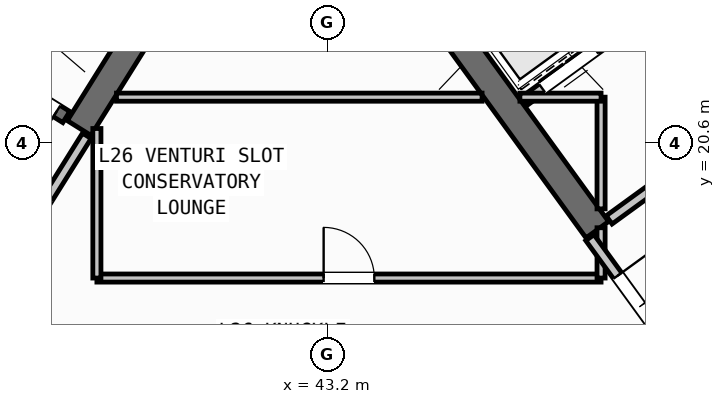
"""IFC4 building model, lengths in metres.
Left out: names, types, materials, properties, quantities, classifications, styles, units other than length and angle.
Written with IfcOpenShell. Run it as: python <this file> out.ifc"""

import sys

from ifc_helpers import new_model, si_unit, direction, frame, frame_2d, origin, place, context, subcontext, project, spatial, rectangle, extrude, source, transform, mapped, element, fill, save


model = new_model("IFC4")
c1 = context("Model", 3, precision=1e-05, world=origin(), true_north=direction((0.0, 1.0)))
c2 = subcontext(c1, "Body", "Model", "MODEL_VIEW")
j1 = project(units=[si_unit("LENGTHUNIT", "METRE"), si_unit("PLANEANGLEUNIT", "RADIAN")], contexts=[c1])
p1 = place(None, origin())
s1 = spatial("IfcSite", under=j1, at=p1, CompositionType="ELEMENT")
p2 = place(p1, origin())
s2 = spatial("IfcBuilding", under=s1, at=p2, CompositionType="ELEMENT")
p3 = place(p2, frame((0.0, 0.0, 105.3)))
s3 = spatial("IfcBuildingStorey", under=s2, at=p3, CompositionType="ELEMENT", Elevation=105.3)
p4 = place(p3, frame((40.194, 23.922, 0.0), z_axis=(0.0, 0.0, 1.0), x_axis=(-0.529888438328, -0.848067357541, 0.0)))
e1 = element("IfcWall", 1, at=p4, inside=s3, PredefinedType="SHEAR", context=c2, shape_type="SweptSolid", body=[
    extrude(rectangle(XDim=3.575, YDim=0.55, at=frame_2d((1.788, 0.0))), origin(), (0.0, 0.0, 1.0), 3.35),
])
p5 = place(p3, frame((48.526, 18.884, 0.0), z_axis=(0.0, 0.0, 1.0), x_axis=(-0.587764933797, 0.809031756236, 0.0)))
e2 = element("IfcWall", 2, at=p5, inside=s3, PredefinedType="SHEAR", context=c2, shape_type="SweptSolid", body=[
    extrude(rectangle(XDim=6.425, YDim=0.55, at=frame_2d((3.212, 0.0))), origin(), (0.0, 0.0, 1.0), 3.35),
])
p6 = place(p3, frame((38.046, 21.108, 0.0), z_axis=(0.0, 0.0, 1.0), x_axis=(-0.848054434086, 0.529909121291, 0.0)))
e3 = element("IfcWall", 3, at=p6, inside=s3, PredefinedType="SHEAR", context=c2, shape_type="SweptSolid", body=[
    extrude(rectangle(XDim=7.33, YDim=0.26, at=frame_2d((3.665, 0.0))), origin(), (0.0, 0.0, 1.0), 3.35),
])
p7 = place(p6, frame((0.22, 0.0, 0.0)))
e4 = element("IfcOpeningElement", 4, at=p7, cuts=e3, PredefinedType="OPENING", context=c2, shape_type="SweptSolid", body=[
    extrude(rectangle(XDim=1.1, YDim=2.1, at=frame_2d((0.55, 1.05))), frame((0.0, 0.14, 0.0), z_axis=(0.0, -1.0, 0.0), x_axis=(1.0, 0.0, 0.0)), (0.0, 0.0, 1.0), 0.28),
])
p8 = place(p3, frame((47.065, 21.407, 0.0), z_axis=(0.0, 0.0, 1.0), x_axis=(0.809032984992, 0.587763242466, 0.0)))
e5 = element("IfcWall", 5, at=p8, inside=s3, PredefinedType="STANDARD", context=c2, shape_type="SweptSolid", body=[
    extrude(rectangle(XDim=3.448, YDim=0.2, at=frame_2d((1.724, 0.0))), origin(), (0.0, 0.0, 1.0), 3.34),
])
p9 = place(p8, frame((0.458, 0.0, 0.0)))
e6 = element("IfcOpeningElement", 6, at=p9, cuts=e5, PredefinedType="OPENING", context=c2, shape_type="SweptSolid", body=[
    extrude(rectangle(XDim=1.3, YDim=2.2, at=frame_2d((0.65, 1.1))), frame((0.0, 0.11, 0.0), z_axis=(0.0, -1.0, 0.0), x_axis=(1.0, 0.0, 0.0)), (0.0, 0.0, 1.0), 0.22),
])
p10 = place(p3, frame((48.758, 19.077, 0.0), z_axis=(0.0, 0.0, 1.0), x_axis=(0.809005065155, 0.587801671104, 0.0)))
e7 = element("IfcWall", 7, at=p10, inside=s3, PredefinedType="STANDARD", context=c2, shape_type="SweptSolid", body=[
    extrude(rectangle(XDim=5.768, YDim=0.2, at=frame_2d((2.884, 0.0))), origin(), (0.0, 0.0, 1.0), 3.34),
])
p11 = place(p10, frame((2.548, 0.0, 0.0)))
e8 = element("IfcOpeningElement", 8, at=p11, cuts=e7, PredefinedType="OPENING", context=c2, shape_type="SweptSolid", body=[
    extrude(rectangle(XDim=1.15, YDim=2.1, at=frame_2d((0.575, 1.05))), frame((0.0, 0.11, 0.0), z_axis=(0.0, -1.0, 0.0), x_axis=(1.0, 0.0, 0.0)), (0.0, 0.0, 1.0), 0.22),
])
p12 = place(p3, frame((38.451, 20.737, 0.0), z_axis=(0.0, 0.0, 1.0), x_axis=(-0.529924799939, -0.848044637038, 0.0)))
e9 = element("IfcWall", 9, at=p12, inside=s3, PredefinedType="STANDARD", context=c2, shape_type="SweptSolid", body=[
    extrude(rectangle(XDim=2.96, YDim=0.2, at=frame_2d((1.48, 0.0))), origin(), (0.0, 0.0, 1.0), 3.34),
])
p13 = place(p12, frame((1.46, 0.0, 0.0)))
e10 = element("IfcOpeningElement", 10, at=p13, cuts=e9, PredefinedType="OPENING", context=c2, shape_type="SweptSolid", body=[
    extrude(rectangle(XDim=0.86, YDim=2.05, at=frame_2d((0.43, 1.025))), frame((0.0, 0.11, 0.0), z_axis=(0.0, -1.0, 0.0), x_axis=(1.0, 0.0, 0.0)), (0.0, 0.0, 1.0), 0.22),
])
p14 = place(p3, frame((38.65, 17.93, 0.0), z_axis=(0.0, 0.0, 1.0), x_axis=(1.0, 0.0, 0.0)))
e11 = element("IfcWall", 11, at=p14, inside=s3, PredefinedType="PARTITIONING", context=c2, shape_type="SweptSolid", body=[
    extrude(rectangle(XDim=9.95, YDim=0.16, at=frame_2d((4.975, 0.0))), origin(), (0.0, 0.0, 1.0), 3.34),
])
p15 = place(p14, frame((4.475, 0.0, 0.0)))
e12 = element("IfcOpeningElement", 12, at=p15, cuts=e11, PredefinedType="OPENING", context=c2, shape_type="SweptSolid", body=[
    extrude(rectangle(XDim=1.0, YDim=2.1, at=frame_2d((0.5, 1.05))), frame((0.0, 0.09, 0.0), z_axis=(0.0, -1.0, 0.0), x_axis=(1.0, 0.0, 0.0)), (0.0, 0.0, 1.0), 0.18),
])
p16 = place(p3, frame((38.65, 17.93, 0.0), z_axis=(0.0, 0.0, 1.0), x_axis=(0.0, 1.0, 0.0)))
e13 = element("IfcWall", 13, at=p16, inside=s3, PredefinedType="PARTITIONING", context=c2, shape_type="SweptSolid", body=[
    extrude(rectangle(XDim=2.951, YDim=0.16, at=frame_2d((1.476, 0.0))), origin(), (0.0, 0.0, 1.0), 3.34),
])
p17 = place(p3, frame((48.6, 17.93, 0.0), z_axis=(0.0, 0.0, 1.0), x_axis=(0.0, 1.0, 0.0)))
e14 = element("IfcWall", 14, at=p17, inside=s3, PredefinedType="PARTITIONING", context=c2, shape_type="SweptSolid", body=[
    extrude(rectangle(XDim=0.993, YDim=0.16, at=frame_2d((0.496, 0.0))), origin(), (0.0, 0.0, 1.0), 3.34),
])
p18 = place(p3, frame((48.6, 19.295, 0.0), z_axis=(0.0, 0.0, 1.0), x_axis=(0.0, 1.0, 0.0)))
e15 = element("IfcWall", 15, at=p18, inside=s3, PredefinedType="PARTITIONING", context=c2, shape_type="SweptSolid", body=[
    extrude(rectangle(XDim=2.205, YDim=0.16, at=frame_2d((1.103, 0.0))), origin(), (0.0, 0.0, 1.0), 3.34),
])
p19 = place(p3, frame((39.037, 21.5, 0.0), z_axis=(0.0, 0.0, 1.0), x_axis=(1.0, 0.0, 0.0)))
e16 = element("IfcWall", 16, at=p19, inside=s3, PredefinedType="PARTITIONING", context=c2, shape_type="SweptSolid", body=[
    extrude(rectangle(XDim=7.215, YDim=0.16, at=frame_2d((3.607, 0.0))), origin(), (0.0, 0.0, 1.0), 3.34),
])
p20 = place(p3, frame((46.998, 21.5, 0.0), z_axis=(0.0, 0.0, 1.0), x_axis=(1.0, 0.0, 0.0)))
e17 = element("IfcWall", 17, at=p20, inside=s3, PredefinedType="PARTITIONING", context=c2, shape_type="SweptSolid", body=[
    extrude(rectangle(XDim=1.602, YDim=0.16, at=frame_2d((0.801, 0.0))), origin(), (0.0, 0.0, 1.0), 3.34),
])
p21 = place(p3, frame((50.119, 16.333, 0.0), z_axis=(0.0, 0.0, 1.0), x_axis=(-0.587749856981, 0.809042709391, 0.0)))
e18 = element("IfcWall", 18, at=p21, inside=s3, PredefinedType="STANDARD", context=c2, shape_type="SweptSolid", body=[
    extrude(rectangle(XDim=2.96, YDim=0.2, at=frame_2d((1.48, 0.0))), origin(), (0.0, 0.0, 1.0), 3.34),
])
p22 = place(p21, frame((0.53, 0.0, 0.0)))
e19 = element("IfcOpeningElement", 19, at=p22, cuts=e18, PredefinedType="OPENING", context=c2, shape_type="SweptSolid", body=[
    extrude(rectangle(XDim=1.5, YDim=2.15, at=frame_2d((0.75, 1.075))), frame((0.0, 0.11, 0.0), z_axis=(0.0, -1.0, 0.0), x_axis=(1.0, 0.0, 0.0)), (0.0, 0.0, 1.0), 0.22),
])
m1 = source(origin(), c2, "Body", "SweptSolid", [
    extrude(rectangle(XDim=1.1, YDim=2.1, at=frame_2d((0.55, 1.05))), frame((0.0, 0.025, 0.0), z_axis=(0.0, -1.0, 0.0), x_axis=(1.0, 0.0, 0.0)), (0.0, 0.0, 1.0), 0.05),
])
p23 = place(p7, origin())
e20 = element("IfcDoor", 20, at=p23, inside=s3, OperationType="SINGLE_SWING_LEFT", PredefinedType="DOOR", context=c2, shape_type="MappedRepresentation", body=[
    mapped(m1, transform((0.0, 0.0, 0.0), scale=1.0)),
])
fill(e4, e20)
m2 = source(origin(), c2, "Body", "SweptSolid", [
    extrude(rectangle(XDim=1.3, YDim=2.2, at=frame_2d((0.65, 1.1))), frame((0.0, 0.025, 0.0), z_axis=(0.0, -1.0, 0.0), x_axis=(1.0, 0.0, 0.0)), (0.0, 0.0, 1.0), 0.05),
])
p24 = place(p9, origin())
e21 = element("IfcDoor", 21, at=p24, inside=s3, OperationType="DOUBLE_DOOR_SLIDING", PredefinedType="DOOR", context=c2, shape_type="MappedRepresentation", body=[
    mapped(m2, transform((0.0, 0.0, 0.0), scale=1.0)),
])
fill(e6, e21)
m3 = source(origin(), c2, "Body", "SweptSolid", [
    extrude(rectangle(XDim=1.0, YDim=2.1, at=frame_2d((0.5, 1.05))), frame((0.0, 0.025, 0.0), z_axis=(0.0, -1.0, 0.0), x_axis=(1.0, 0.0, 0.0)), (0.0, 0.0, 1.0), 0.05),
])
p25 = place(p15, origin())
e22 = element("IfcDoor", 22, at=p25, inside=s3, OperationType="SINGLE_SWING_LEFT", PredefinedType="DOOR", context=c2, shape_type="MappedRepresentation", body=[
    mapped(m3, transform((0.0, 0.0, 0.0), scale=1.0)),
])
fill(e12, e22)
m4 = source(origin(), c2, "Body", "SweptSolid", [
    extrude(rectangle(XDim=1.5, YDim=2.15, at=frame_2d((0.75, 1.075))), frame((0.0, 0.025, 0.0), z_axis=(0.0, -1.0, 0.0), x_axis=(1.0, 0.0, 0.0)), (0.0, 0.0, 1.0), 0.05),
])
p26 = place(p22, frame((1.5, 0.0, 0.0), z_axis=(0.0, 0.0, 1.0), x_axis=(-1.0, 0.0, 0.0)))
e23 = element("IfcDoor", 23, at=p26, inside=s3, OperationType="DOUBLE_DOOR_SINGLE_SWING", PredefinedType="DOOR", context=c2, shape_type="MappedRepresentation", body=[
    mapped(m4, transform((0.0, 0.0, 0.0), scale=1.0)),
])
fill(e19, e23)
save(model, sys.argv[1])
